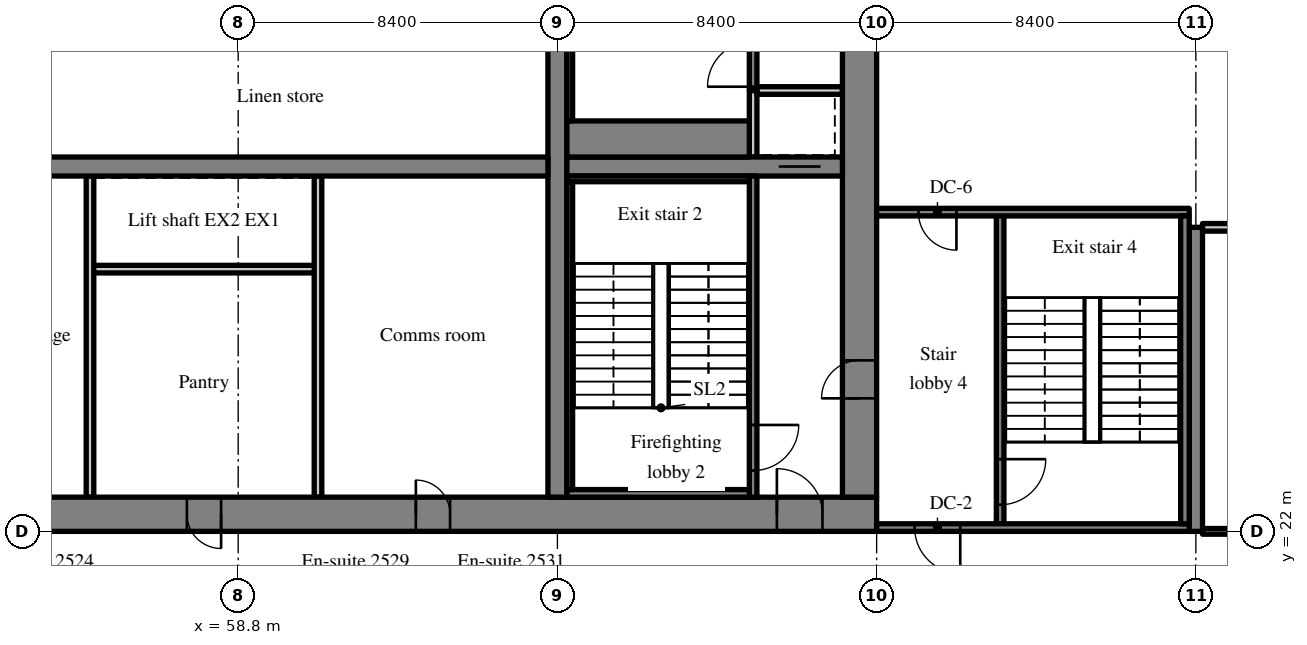
"""IFC4 building model, lengths in metres.
Left out: names, types, materials, properties, quantities, classifications, styles, units other than length and angle.
Written with IfcOpenShell. Run it as: python <this file> out.ifc"""

import sys

from ifc_helpers import new_model, si_unit, direction, frame, frame_2d, origin, place, context, subcontext, project, spatial, rectangle, extrude, source, transform, mapped, element, fill, save


model = new_model("IFC4")
c1 = context("Model", 3, precision=1e-05, world=origin(), true_north=direction((0.0, 1.0)))
c2 = subcontext(c1, "Body", "Model", "MODEL_VIEW")
j1 = project(units=[si_unit("LENGTHUNIT", "METRE"), si_unit("PLANEANGLEUNIT", "RADIAN")], contexts=[c1])
p1 = place(None, origin())
s1 = spatial("IfcSite", under=j1, at=p1, CompositionType="ELEMENT")
p2 = place(p1, origin())
s2 = spatial("IfcBuilding", under=s1, at=p2, CompositionType="ELEMENT")
p3 = place(p2, frame((0.0, 0.0, 106.6)))
s3 = spatial("IfcBuildingStorey", under=s2, at=p3, CompositionType="ELEMENT", Elevation=106.6)
m1 = source(origin(), c2, "Body", "SweptSolid", [
    extrude(rectangle(XDim=50.4, YDim=0.9, at=frame_2d((25.2, 0.0))), origin(), (0.0, 0.0, 1.0), 3.52),
])
p4 = place(p3, frame((25.2, 22.45, 0.0), z_axis=(0.0, 0.0, 1.0), x_axis=(1.0, 0.0, 0.0)))
e1 = element("IfcWall", 1, at=p4, inside=s3, PredefinedType="SHEAR", context=c2, shape_type="MappedRepresentation", body=[
    mapped(m1, transform((0.0, 0.0, 0.0), scale=1.0)),
])
m2 = source(origin(), c2, "Body", "SweptSolid", [
    extrude(rectangle(XDim=1.8, YDim=2.1, at=frame_2d((0.9, 1.05))), frame((0.0, 0.46, 0.0), z_axis=(0.0, -1.0, 0.0), x_axis=(1.0, 0.0, 0.0)), (0.0, 0.0, 1.0), 0.92),
])
p5 = place(p4, frame((15.9, 0.0, 0.0)))
e2 = element("IfcOpeningElement", 2, at=p5, cuts=e1, PredefinedType="OPENING", context=c2, shape_type="MappedRepresentation", body=[
    mapped(m2, transform((0.0, 0.0, 0.0), scale=1.0)),
])
m3 = source(origin(), c2, "Body", "SweptSolid", [
    extrude(rectangle(XDim=1.2, YDim=2.1, at=frame_2d((0.6, 1.05))), frame((0.0, 0.46, 0.0), z_axis=(0.0, -1.0, 0.0), x_axis=(1.0, 0.0, 0.0)), (0.0, 0.0, 1.0), 0.92),
])
p6 = place(p4, frame((26.975, 0.0, 0.0)))
e3 = element("IfcOpeningElement", 3, at=p6, cuts=e1, PredefinedType="OPENING", context=c2, shape_type="MappedRepresentation", body=[
    mapped(m3, transform((0.0, 0.0, 0.0), scale=1.0)),
])
m4 = source(origin(), c2, "Body", "SweptSolid", [
    extrude(rectangle(XDim=0.9, YDim=2.1, at=frame_2d((0.45, 1.05))), frame((0.0, 0.46, 0.0), z_axis=(0.0, -1.0, 0.0), x_axis=(1.0, 0.0, 0.0)), (0.0, 0.0, 1.0), 0.92),
])
p7 = place(p4, frame((32.25, 0.0, 0.0)))
e4 = element("IfcOpeningElement", 4, at=p7, cuts=e1, PredefinedType="OPENING", context=c2, shape_type="MappedRepresentation", body=[
    mapped(m4, transform((0.0, 0.0, 0.0), scale=1.0)),
])
p8 = place(p4, frame((38.275, 0.0, 0.0)))
e5 = element("IfcOpeningElement", 5, at=p8, cuts=e1, PredefinedType="OPENING", context=c2, shape_type="MappedRepresentation", body=[
    mapped(m4, transform((0.0, 0.0, 0.0), scale=1.0)),
])
p9 = place(p4, frame((6.45, 0.0, 0.0)))
e6 = element("IfcOpeningElement", 6, at=p9, cuts=e1, PredefinedType="OPENING", context=c2, shape_type="MappedRepresentation", body=[
    mapped(m3, transform((0.0, 0.0, 0.0), scale=1.0)),
])
p10 = place(p4, frame((47.775, 0.0, 0.0)))
e7 = element("IfcOpeningElement", 7, at=p10, cuts=e1, PredefinedType="OPENING", context=c2, shape_type="MappedRepresentation", body=[
    mapped(m3, transform((0.0, 0.0, 0.0), scale=1.0)),
])
m5 = source(origin(), c2, "Body", "SweptSolid", [
    extrude(rectangle(XDim=18.2, YDim=0.9, at=frame_2d((9.1, 0.0))), origin(), (0.0, 0.0, 1.0), 3.52),
])
p11 = place(p3, frame((75.15, 22.9, 0.0), z_axis=(0.0, 0.0, 1.0), x_axis=(0.0, 1.0, 0.0)))
e8 = element("IfcWall", 8, at=p11, inside=s3, PredefinedType="SHEAR", context=c2, shape_type="MappedRepresentation", body=[
    mapped(m5, transform((0.0, 0.0, 0.0), scale=1.0)),
])
m6 = source(origin(), c2, "Body", "SweptSolid", [
    extrude(rectangle(XDim=1.0, YDim=2.1, at=frame_2d((0.5, 1.05))), frame((0.0, 0.46, 0.0), z_axis=(0.0, -1.0, 0.0), x_axis=(1.0, 0.0, 0.0)), (0.0, 0.0, 1.0), 0.92),
])
p12 = place(p11, frame((2.6, 0.0, 0.0)))
e9 = element("IfcOpeningElement", 9, at=p12, cuts=e8, PredefinedType="OPENING", context=c2, shape_type="MappedRepresentation", body=[
    mapped(m6, transform((0.0, 0.0, 0.0), scale=1.0)),
])
p13 = place(p11, frame((12.5, 0.0, 0.0)))
e10 = element("IfcOpeningElement", 10, at=p13, cuts=e8, PredefinedType="OPENING", context=c2, shape_type="MappedRepresentation", body=[
    mapped(m3, transform((0.0, 0.0, 0.0), scale=1.0)),
])
m7 = source(origin(), c2, "Body", "SweptSolid", [
    extrude(rectangle(XDim=18.2, YDim=0.5, at=frame_2d((9.1, 0.0))), origin(), (0.0, 0.0, 1.0), 3.52),
])
p14 = place(p3, frame((67.2, 22.9, 0.0), z_axis=(0.0, 0.0, 1.0), x_axis=(0.0, 1.0, 0.0)))
e11 = element("IfcWall", 11, at=p14, inside=s3, PredefinedType="SHEAR", context=c2, shape_type="MappedRepresentation", body=[
    mapped(m7, transform((0.0, 0.0, 0.0), scale=1.0)),
])
m8 = source(origin(), c2, "Body", "SweptSolid", [
    extrude(rectangle(XDim=16.3, YDim=0.5, at=frame_2d((8.15, 0.0))), origin(), (0.0, 0.0, 1.0), 3.52),
])
p15 = place(p3, frame((50.65, 31.6, 0.0), z_axis=(0.0, 0.0, 1.0), x_axis=(1.0, 0.0, 0.0)))
e12 = element("IfcWall", 12, at=p15, inside=s3, PredefinedType="SHEAR", context=c2, shape_type="MappedRepresentation", body=[
    mapped(m8, transform((0.0, 0.0, 0.0), scale=1.0)),
])
m9 = source(origin(), c2, "Body", "SweptSolid", [
    extrude(rectangle(XDim=1.0, YDim=2.1, at=frame_2d((0.5, 1.05))), frame((0.0, 0.26, 0.0), z_axis=(0.0, -1.0, 0.0), x_axis=(1.0, 0.0, 0.0)), (0.0, 0.0, 1.0), 0.52),
])
p16 = place(p15, frame((0.575, 0.0, 0.0)))
e13 = element("IfcOpeningElement", 13, at=p16, cuts=e12, PredefinedType="OPENING", context=c2, shape_type="MappedRepresentation", body=[
    mapped(m9, transform((0.0, 0.0, 0.0), scale=1.0)),
])
m10 = source(origin(), c2, "Body", "SweptSolid", [
    extrude(rectangle(XDim=7.25, YDim=0.5, at=frame_2d((3.625, 0.0))), origin(), (0.0, 0.0, 1.0), 3.52),
])
p17 = place(p3, frame((67.45, 31.6, 0.0), z_axis=(0.0, 0.0, 1.0), x_axis=(1.0, 0.0, 0.0)))
e14 = element("IfcWall", 14, at=p17, inside=s3, PredefinedType="SHEAR", context=c2, shape_type="MappedRepresentation", body=[
    mapped(m10, transform((0.0, 0.0, 0.0), scale=1.0)),
])
m11 = source(origin(), c2, "Body", "SweptSolid", [
    extrude(rectangle(XDim=1.1, YDim=2.1, at=frame_2d((0.55, 1.05))), frame((0.0, 0.26, 0.0), z_axis=(0.0, -1.0, 0.0), x_axis=(1.0, 0.0, 0.0)), (0.0, 0.0, 1.0), 0.52),
])
p18 = place(p17, frame((5.575, 0.0, 0.0)))
e15 = element("IfcOpeningElement", 15, at=p18, cuts=e14, PredefinedType="OPENING", context=c2, shape_type="MappedRepresentation", body=[
    mapped(m11, transform((0.0, 0.0, 0.0), scale=1.0)),
])
m12 = source(origin(), c2, "Body", "SweptSolid", [
    extrude(rectangle(XDim=8.0, YDim=0.35, at=frame_2d((4.0, 0.0))), origin(), (0.0, 0.0, 1.0), 3.52),
])
p19 = place(p3, frame((84.0, 22.0, 0.0), z_axis=(0.0, 0.0, 1.0), x_axis=(0.0, 1.0, 0.0)))
e16 = element("IfcWall", 16, at=p19, inside=s3, PredefinedType="SHEAR", context=c2, shape_type="MappedRepresentation", body=[
    mapped(m12, transform((0.0, 0.0, 0.0), scale=1.0)),
])
m13 = source(origin(), c2, "Body", "SweptSolid", [
    extrude(rectangle(XDim=6.0, YDim=0.2, at=frame_2d((3.0, 0.0))), origin(), (0.0, 0.0, 1.0), 3.52),
])
p20 = place(p3, frame((60.9, 28.9, 0.0), z_axis=(0.0, 0.0, 1.0), x_axis=(-1.0, 0.0, 0.0)))
e17 = element("IfcWall", 17, at=p20, inside=s3, PredefinedType="SOLIDWALL", context=c2, shape_type="MappedRepresentation", body=[
    mapped(m13, transform((0.0, 0.0, 0.0), scale=1.0)),
])
m14 = source(origin(), c2, "Body", "SweptSolid", [
    extrude(rectangle(XDim=8.45, YDim=0.2, at=frame_2d((4.225, 0.0))), origin(), (0.0, 0.0, 1.0), 3.52),
])
for number, where, z_axis, x_axis in (
    (18, (54.9, 22.9, 0.0), (0.0, 0.0, 1.0), (0.0, 1.0, 0.0)),
    (19, (60.9, 22.9, 0.0), (0.0, 0.0, 1.0), (0.0, 1.0, 0.0)),
):
    element("IfcWall", number, at=place(p3, frame(where, z_axis=z_axis, x_axis=x_axis)), inside=s3, PredefinedType="PARTITIONING", context=c2, shape_type="MappedRepresentation", body=[
        mapped(m14, transform((0.0, 0.0, 0.0), scale=1.0)),
    ])
m15 = source(origin(), c2, "Body", "SweptSolid", [
    extrude(rectangle(XDim=8.45, YDim=0.2, at=frame_2d((4.225, 0.0))), origin(), (0.0, 0.0, 1.0), 3.52),
])
p21 = place(p3, frame((72.35, 22.9, 0.0), z_axis=(0.0, 0.0, 1.0), x_axis=(0.0, 1.0, 0.0)))
e20 = element("IfcWall", 20, at=p21, inside=s3, PredefinedType="SOLIDWALL", context=c2, shape_type="MappedRepresentation", body=[
    mapped(m15, transform((0.0, 0.0, 0.0), scale=1.0)),
])
m16 = source(origin(), c2, "Body", "SweptSolid", [
    extrude(rectangle(XDim=1.2, YDim=2.1, at=frame_2d((0.6, 1.05))), frame((0.0, 0.11, 0.0), z_axis=(0.0, -1.0, 0.0), x_axis=(1.0, 0.0, 0.0)), (0.0, 0.0, 1.0), 0.22),
])
p22 = place(p21, frame((0.7, 0.0, 0.0)))
e21 = element("IfcOpeningElement", 21, at=p22, cuts=e20, PredefinedType="OPENING", context=c2, shape_type="MappedRepresentation", body=[
    mapped(m16, transform((0.0, 0.0, 0.0), scale=1.0)),
])
m17 = source(origin(), c2, "Body", "SweptSolid", [
    extrude(rectangle(XDim=1.75, YDim=0.2, at=frame_2d((0.875, 0.0))), origin(), (0.0, 0.0, 1.0), 3.52),
])
p23 = place(p3, frame((72.35, 31.85, 0.0), z_axis=(0.0, 0.0, 1.0), x_axis=(0.0, 1.0, 0.0)))
e22 = element("IfcWall", 22, at=p23, inside=s3, PredefinedType="SOLIDWALL", context=c2, shape_type="MappedRepresentation", body=[
    mapped(m17, transform((0.0, 0.0, 0.0), scale=1.0)),
])
m18 = source(origin(), c2, "Body", "SweptSolid", [
    extrude(rectangle(XDim=2.25, YDim=0.2, at=frame_2d((1.125, 0.0))), origin(), (0.0, 0.0, 1.0), 3.52),
])
p24 = place(p3, frame((72.45, 33.6, 0.0), z_axis=(0.0, 0.0, 1.0), x_axis=(1.0, 0.0, 0.0)))
e23 = element("IfcWall", 23, at=p24, inside=s3, PredefinedType="SOLIDWALL", context=c2, shape_type="MappedRepresentation", body=[
    mapped(m18, transform((0.0, 0.0, 0.0), scale=1.0)),
])
m19 = source(origin(), c2, "Body", "SweptSolid", [
    extrude(rectangle(XDim=7.5, YDim=0.2, at=frame_2d((3.75, 0.0))), origin(), (0.0, 0.0, 1.0), 3.52),
])
p25 = place(p3, frame((72.35, 33.6, 0.0), z_axis=(0.0, 0.0, 1.0), x_axis=(0.0, 1.0, 0.0)))
e24 = element("IfcWall", 24, at=p25, inside=s3, PredefinedType="SOLIDWALL", context=c2, shape_type="MappedRepresentation", body=[
    mapped(m19, transform((0.0, 0.0, 0.0), scale=1.0)),
])
p26 = place(p25, frame((0.1, 0.0, 0.0)))
e25 = element("IfcOpeningElement", 25, at=p26, cuts=e24, PredefinedType="OPENING", context=c2, shape_type="MappedRepresentation", body=[
    mapped(m16, transform((0.0, 0.0, 0.0), scale=1.0)),
])
m20 = source(origin(), c2, "Body", "SweptSolid", [
    extrude(rectangle(XDim=8.3, YDim=0.2, at=frame_2d((4.15, 0.0))), origin(), (0.0, 0.0, 1.0), 3.52),
])
p27 = place(p3, frame((78.85, 22.1, 0.0), z_axis=(0.0, 0.0, 1.0), x_axis=(0.0, 1.0, 0.0)))
e26 = element("IfcWall", 26, at=p27, inside=s3, PredefinedType="SOLIDWALL", context=c2, shape_type="MappedRepresentation", body=[
    mapped(m20, transform((0.0, 0.0, 0.0), scale=1.0)),
])
p28 = place(p27, frame((0.6, 0.0, 0.0)))
e27 = element("IfcOpeningElement", 27, at=p28, cuts=e26, PredefinedType="OPENING", context=c2, shape_type="MappedRepresentation", body=[
    mapped(m16, transform((0.0, 0.0, 0.0), scale=1.0)),
])
m21 = source(origin(), c2, "Body", "SweptSolid", [
    extrude(rectangle(XDim=8.225, YDim=0.2, at=frame_2d((4.112, 0.0))), origin(), (0.0, 0.0, 1.0), 3.52),
])
p29 = place(p3, frame((83.825, 22.1, 0.0), z_axis=(0.0, 0.0, 1.0), x_axis=(-1.0, 0.0, 0.0)))
e28 = element("IfcWall", 28, at=p29, inside=s3, PredefinedType="SOLIDWALL", context=c2, shape_type="MappedRepresentation", body=[
    mapped(m21, transform((0.0, 0.0, 0.0), scale=1.0)),
])
p30 = place(p29, frame((6.025, 0.0, 0.0)))
e29 = element("IfcOpeningElement", 29, at=p30, cuts=e28, PredefinedType="OPENING", context=c2, shape_type="MappedRepresentation", body=[
    mapped(m16, transform((0.0, 0.0, 0.0), scale=1.0)),
])
p31 = place(p3, frame((83.825, 30.4, 0.0), z_axis=(0.0, 0.0, 1.0), x_axis=(-1.0, 0.0, 0.0)))
e30 = element("IfcWall", 30, at=p31, inside=s3, PredefinedType="SOLIDWALL", context=c2, shape_type="MappedRepresentation", body=[
    mapped(m21, transform((0.0, 0.0, 0.0), scale=1.0)),
])
m22 = source(origin(), c2, "Body", "SweptSolid", [
    extrude(rectangle(XDim=1.0, YDim=2.1, at=frame_2d((0.5, 1.05))), frame((0.0, 0.11, 0.0), z_axis=(0.0, -1.0, 0.0), x_axis=(1.0, 0.0, 0.0)), (0.0, 0.0, 1.0), 0.22),
])
p32 = place(p31, frame((6.125, 0.0, 0.0)))
e31 = element("IfcOpeningElement", 31, at=p32, cuts=e30, PredefinedType="OPENING", context=c2, shape_type="MappedRepresentation", body=[
    mapped(m22, transform((0.0, 0.0, 0.0), scale=1.0)),
])
m23 = source(origin(), c2, "Body", "SweptSolid", [
    extrude(rectangle(XDim=4.8, YDim=0.2, at=frame_2d((2.4, 0.0))), origin(), (0.0, 0.0, 1.0), 3.52),
])
p33 = place(p3, frame((67.45, 23.0, 0.0), z_axis=(0.0, 0.0, 1.0), x_axis=(1.0, 0.0, 0.0)))
e32 = element("IfcWall", 32, at=p33, inside=s3, PredefinedType="SOLIDWALL", context=c2, shape_type="MappedRepresentation", body=[
    mapped(m23, transform((0.0, 0.0, 0.0), scale=1.0)),
])
m24 = source(origin(), c2, "Body", "SweptSolid", [
    extrude(rectangle(XDim=4.8, YDim=0.15, at=frame_2d((2.4, 0.0))), origin(), (0.0, 0.0, 1.0), 3.52),
])
p34 = place(p3, frame((67.45, 31.275, 0.0), z_axis=(0.0, 0.0, 1.0), x_axis=(1.0, 0.0, 0.0)))
e33 = element("IfcWall", 33, at=p34, inside=s3, PredefinedType="SOLIDWALL", context=c2, shape_type="MappedRepresentation", body=[
    mapped(m24, transform((0.0, 0.0, 0.0), scale=1.0)),
])
m25 = source(origin(), c2, "Body", "SweptSolid", [
    extrude(rectangle(XDim=8.1, YDim=0.15, at=frame_2d((4.05, 0.0))), origin(), (0.0, 0.0, 1.0), 3.52),
])
p35 = place(p3, frame((67.525, 23.1, 0.0), z_axis=(0.0, 0.0, 1.0), x_axis=(0.0, 1.0, 0.0)))
e34 = element("IfcWall", 34, at=p35, inside=s3, PredefinedType="SOLIDWALL", context=c2, shape_type="MappedRepresentation", body=[
    mapped(m25, transform((0.0, 0.0, 0.0), scale=1.0)),
])
m26 = source(origin(), c2, "Body", "SweptSolid", [
    extrude(rectangle(XDim=4.8, YDim=0.95, at=frame_2d((2.4, 0.0))), origin(), (0.0, 0.0, 1.0), 3.52),
])
p36 = place(p3, frame((67.45, 32.325, 0.0), z_axis=(0.0, 0.0, 1.0), x_axis=(1.0, 0.0, 0.0)))
e35 = element("IfcWall", 35, at=p36, inside=s3, PredefinedType="SOLIDWALL", context=c2, shape_type="MappedRepresentation", body=[
    mapped(m26, transform((0.0, 0.0, 0.0), scale=1.0)),
])
p37 = place(p3, frame((67.525, 32.8, 0.0), z_axis=(0.0, 0.0, 1.0), x_axis=(0.0, 1.0, 0.0)))
e36 = element("IfcWall", 36, at=p37, inside=s3, PredefinedType="SOLIDWALL", context=c2, shape_type="MappedRepresentation", body=[
    mapped(m25, transform((0.0, 0.0, 0.0), scale=1.0)),
])
m27 = source(origin(), c2, "Body", "SweptSolid", [
    extrude(rectangle(XDim=8.1, YDim=0.225, at=frame_2d((4.05, 0.0))), origin(), (0.0, 0.0, 1.0), 3.52),
])
p38 = place(p3, frame((83.713, 22.2, 0.0), z_axis=(0.0, 0.0, 1.0), x_axis=(0.0, 1.0, 0.0)))
e37 = element("IfcWall", 37, at=p38, inside=s3, PredefinedType="SOLIDWALL", context=c2, shape_type="MappedRepresentation", body=[
    mapped(m27, transform((0.0, 0.0, 0.0), scale=1.0)),
])
m28 = source(origin(), c2, "Body", "SweptSolid", [
    extrude(rectangle(XDim=8.05, YDim=0.15, at=frame_2d((4.025, 0.0))), origin(), (0.0, 0.0, 1.0), 2.82),
])
p39 = place(p3, frame((84.175, 22.0, 0.0), z_axis=(0.0, 0.0, 1.0), x_axis=(1.0, 0.0, 0.0)))
e38 = element("IfcWall", 38, at=p39, inside=s3, PredefinedType="PARTITIONING", context=c2, shape_type="MappedRepresentation", body=[
    mapped(m28, transform((0.0, 0.0, 0.0), scale=1.0)),
])
m29 = source(origin(), c2, "Body", "SweptSolid", [
    extrude(rectangle(XDim=1.8, YDim=2.1, at=frame_2d((0.9, 1.05))), frame((0.0, 0.085, 0.0), z_axis=(0.0, -1.0, 0.0), x_axis=(1.0, 0.0, 0.0)), (0.0, 0.0, 1.0), 0.17),
])
p40 = place(p39, frame((3.125, 0.0, 0.0)))
e39 = element("IfcOpeningElement", 39, at=p40, cuts=e38, PredefinedType="OPENING", context=c2, shape_type="MappedRepresentation", body=[
    mapped(m29, transform((0.0, 0.0, 0.0), scale=1.0)),
])
m30 = source(origin(), c2, "Body", "SweptSolid", [
    extrude(rectangle(XDim=8.05, YDim=0.2, at=frame_2d((4.025, 0.0))), origin(), (0.0, 0.0, 1.0), 3.52),
])
p41 = place(p3, frame((84.175, 30.0, 0.0), z_axis=(0.0, 0.0, 1.0), x_axis=(1.0, 0.0, 0.0)))
e40 = element("IfcWall", 40, at=p41, inside=s3, PredefinedType="PARTITIONING", context=c2, shape_type="MappedRepresentation", body=[
    mapped(m30, transform((0.0, 0.0, 0.0), scale=1.0)),
])
m31 = source(origin(), c2, "Body", "SweptSolid", [
    extrude(rectangle(XDim=0.9, YDim=2.1, at=frame_2d((0.45, 1.05))), frame((0.0, 0.375, 0.0), z_axis=(0.0, -1.0, 0.0), x_axis=(1.0, 0.0, 0.0)), (0.0, 0.0, 1.0), 0.05),
])
p42 = place(p7, origin())
e41 = element("IfcDoor", 41, at=p42, inside=s3, OperationType="SINGLE_SWING_RIGHT", PredefinedType="DOOR", context=c2, shape_type="MappedRepresentation", body=[
    mapped(m31, transform((0.0, 0.0, 0.0), scale=1.0)),
])
fill(e4, e41)
p43 = place(p8, origin())
e42 = element("IfcDoor", 42, at=p43, inside=s3, OperationType="SINGLE_SWING_LEFT", PredefinedType="DOOR", context=c2, shape_type="MappedRepresentation", body=[
    mapped(m31, transform((0.0, 0.0, 0.0), scale=1.0)),
])
fill(e5, e42)
m32 = source(origin(), c2, "Body", "SweptSolid", [
    extrude(rectangle(XDim=1.2, YDim=2.1, at=frame_2d((0.6, 1.05))), frame((0.0, 0.025, 0.0), z_axis=(0.0, -1.0, 0.0), x_axis=(1.0, 0.0, 0.0)), (0.0, 0.0, 1.0), 0.05),
])
p44 = place(p22, origin())
e43 = element("IfcDoor", 43, at=p44, inside=s3, OperationType="SINGLE_SWING_RIGHT", PredefinedType="DOOR", context=c2, shape_type="MappedRepresentation", body=[
    mapped(m32, transform((0.0, 0.0, 0.0), scale=1.0)),
])
fill(e21, e43)
m33 = source(origin(), c2, "Body", "SweptSolid", [
    extrude(rectangle(XDim=1.2, YDim=2.1, at=frame_2d((0.6, 1.05))), frame((0.0, 0.375, 0.0), z_axis=(0.0, -1.0, 0.0), x_axis=(1.0, 0.0, 0.0)), (0.0, 0.0, 1.0), 0.05),
])
p45 = place(p10, origin())
e44 = element("IfcDoor", 44, at=p45, inside=s3, OperationType="SINGLE_SWING_LEFT", PredefinedType="DOOR", context=c2, shape_type="MappedRepresentation", body=[
    mapped(m33, transform((0.0, 0.0, 0.0), scale=1.0)),
])
fill(e7, e44)
m34 = source(origin(), c2, "Body", "SweptSolid", [
    extrude(rectangle(XDim=1.1, YDim=2.1, at=frame_2d((0.55, 1.05))), frame((0.0, 0.025, 0.0), z_axis=(0.0, -1.0, 0.0), x_axis=(1.0, 0.0, 0.0)), (0.0, 0.0, 1.0), 0.05),
])
p46 = place(p18, origin())
e45 = element("IfcDoor", 45, at=p46, inside=s3, OperationType="SLIDING_TO_RIGHT", PredefinedType="DOOR", context=c2, shape_type="MappedRepresentation", body=[
    mapped(m34, transform((0.0, 0.0, 0.0), scale=1.0)),
])
fill(e15, e45)
m35 = source(origin(), c2, "Body", "SweptSolid", [
    extrude(rectangle(XDim=1.0, YDim=2.1, at=frame_2d((0.5, 1.05))), frame((0.0, 0.025, 0.0), z_axis=(0.0, -1.0, 0.0), x_axis=(1.0, 0.0, 0.0)), (0.0, 0.0, 1.0), 0.05),
])
p47 = place(p12, origin())
e46 = element("IfcDoor", 46, at=p47, inside=s3, OperationType="SINGLE_SWING_LEFT", PredefinedType="DOOR", context=c2, shape_type="MappedRepresentation", body=[
    mapped(m35, transform((0.0, 0.0, 0.0), scale=1.0)),
])
fill(e9, e46)
p48 = place(p26, origin())
e47 = element("IfcDoor", 47, at=p48, inside=s3, OperationType="SINGLE_SWING_LEFT", PredefinedType="DOOR", context=c2, shape_type="MappedRepresentation", body=[
    mapped(m32, transform((0.0, 0.0, 0.0), scale=1.0)),
])
fill(e25, e47)
p49 = place(p28, origin())
e48 = element("IfcDoor", 48, at=p49, inside=s3, OperationType="SINGLE_SWING_RIGHT", PredefinedType="DOOR", context=c2, shape_type="MappedRepresentation", body=[
    mapped(m32, transform((0.0, 0.0, 0.0), scale=1.0)),
])
fill(e27, e48)
p50 = place(p30, origin())
e49 = element("IfcDoor", 49, at=p50, inside=s3, OperationType="SINGLE_SWING_LEFT", PredefinedType="DOOR", context=c2, shape_type="MappedRepresentation", body=[
    mapped(m32, transform((0.0, 0.0, 0.0), scale=1.0)),
])
fill(e29, e49)
p51 = place(p32, origin())
e50 = element("IfcDoor", 50, at=p51, inside=s3, OperationType="SINGLE_SWING_LEFT", PredefinedType="DOOR", context=c2, shape_type="MappedRepresentation", body=[
    mapped(m35, transform((0.0, 0.0, 0.0), scale=1.0)),
])
fill(e31, e50)
save(model, sys.argv[1])
